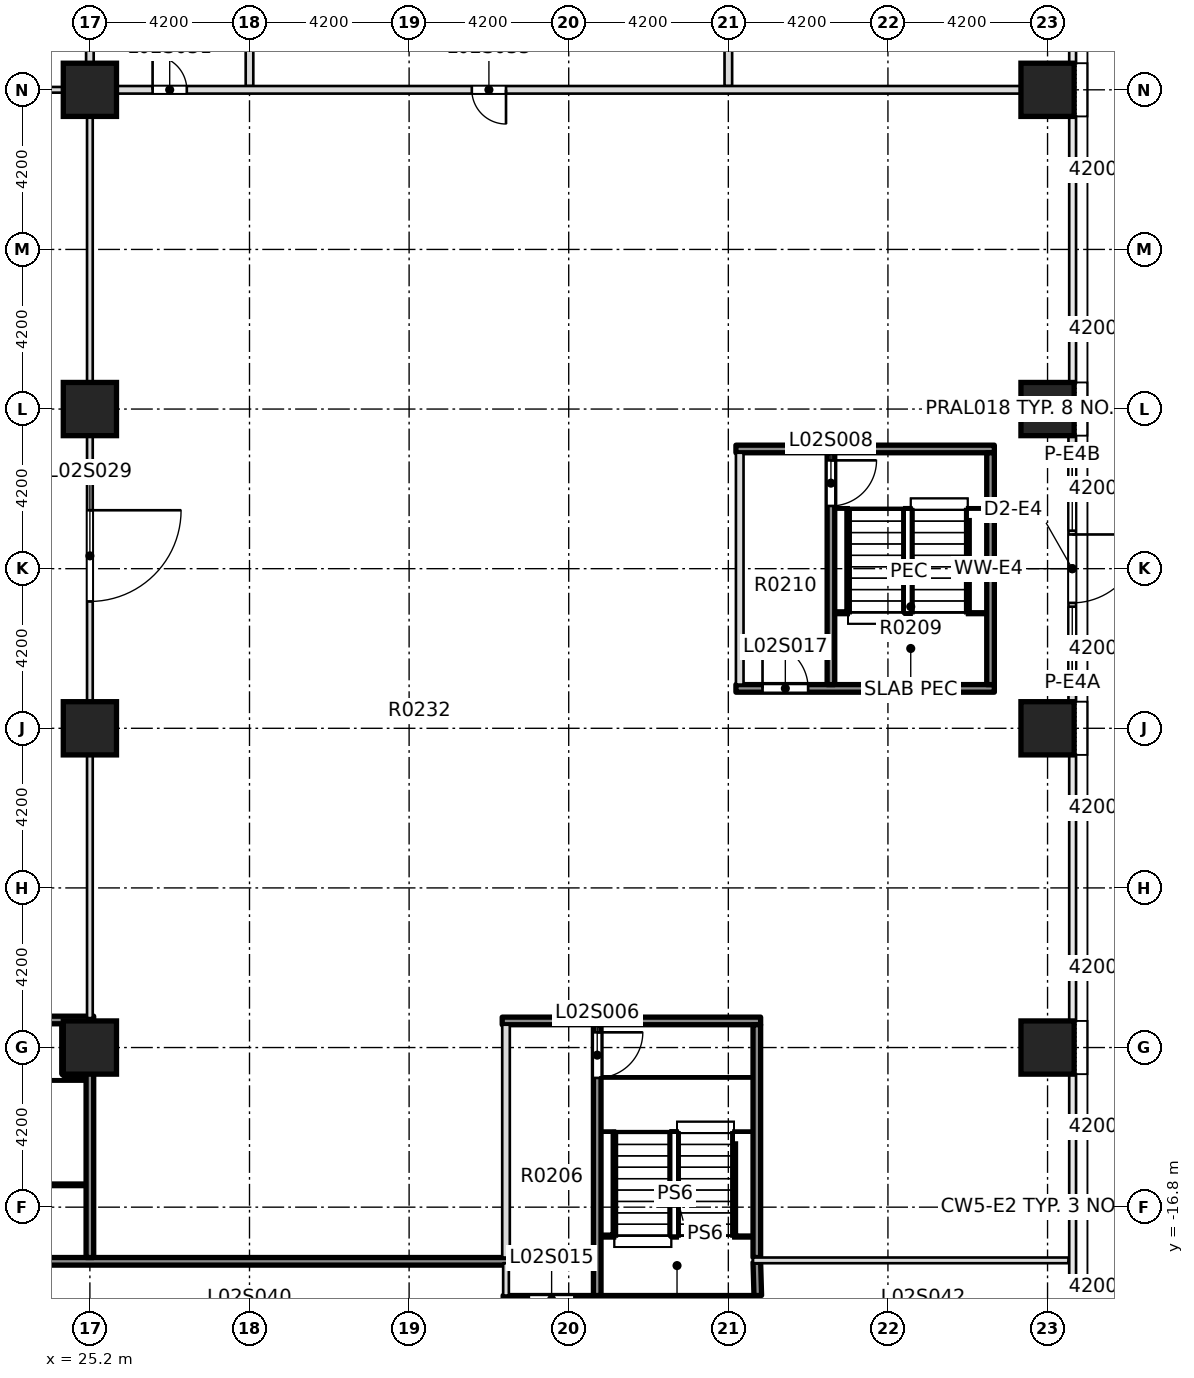
"""IFC4 building model, lengths in metres.
Left out: names, types, materials, properties, quantities, classifications, styles, units other than length and angle.
Written with IfcOpenShell. Run it as: python <this file> out.ifc"""

import sys

from ifc_helpers import new_model, si_unit, direction, frame, frame_2d, origin, origin_2d, place, context, subcontext, project, spatial, rectangle, extrude, element, fill, save


model = new_model("IFC4")
c1 = context("Model", 3, precision=1e-05, world=origin(), true_north=direction((0.0, 1.0)))
c2 = subcontext(c1, "Body", "Model", "MODEL_VIEW")
j1 = project(units=[si_unit("LENGTHUNIT", "METRE"), si_unit("PLANEANGLEUNIT", "RADIAN")], contexts=[c1])
p1 = place(None, origin())
s1 = spatial("IfcSite", under=j1, at=p1, CompositionType="ELEMENT")
p2 = place(p1, origin())
s2 = spatial("IfcBuilding", under=s1, at=p2, CompositionType="ELEMENT")
p3 = place(p2, frame((0.0, 0.0, 12.5)))
s3 = spatial("IfcBuildingStorey", under=s2, at=p3, CompositionType="ELEMENT", Elevation=12.5)
for number, where, z_axis, x_axis in (
    (1, (25.2, -12.6, -0.4), (0.0, 0.0, 1.0), (1.0, 0.0, 0.0)),
    (2, (25.2, -4.2, -0.4), (0.0, 0.0, 1.0), (1.0, 0.0, 0.0)),
    (3, (25.2, 4.2, -0.4), (0.0, 0.0, 1.0), (1.0, 0.0, 0.0)),
    (4, (25.2, 12.6, -0.4), (0.0, 0.0, 1.0), (1.0, 0.0, 0.0)),
    (5, (50.4, -12.6, 0.0), (0.0, 0.0, 1.0), (1.0, 0.0, 0.0)),
    (6, (50.4, -4.2, 0.0), (0.0, 0.0, 1.0), (1.0, 0.0, 0.0)),
    (7, (50.4, 4.2, 0.0), (0.0, 0.0, 1.0), (1.0, 0.0, 0.0)),
    (8, (50.4, 12.6, 0.0), (0.0, 0.0, 1.0), (1.0, 0.0, 0.0)),
):
    element("IfcColumn", number, at=place(p3, frame(where, z_axis=z_axis, x_axis=x_axis)), inside=s3, PredefinedType="COLUMN", context=c2, shape_type="SweptSolid", body=[
        extrude(rectangle(XDim=1.4, YDim=1.4, at=origin_2d()), origin(), (0.0, 0.0, 1.0), 7.5),
    ])
p4 = place(p3, frame((36.075, -19.225, 0.0), z_axis=(0.0, 0.0, 1.0), x_axis=(1.0, 0.0, 0.0)))
e9 = element("IfcWall", 9, at=p4, inside=s3, PredefinedType="SOLIDWALL", context=c2, shape_type="SweptSolid", body=[
    extrude(rectangle(XDim=6.75, YDim=0.2, at=frame_2d((3.375, 0.0))), origin(), (0.0, 0.0, 1.0), 7.1),
])
p5 = place(p4, frame((0.675, 0.0, 0.0)))
e10 = element("IfcOpeningElement", 10, at=p5, cuts=e9, PredefinedType="OPENING", context=c2, shape_type="SweptSolid", body=[
    extrude(rectangle(XDim=1.2, YDim=2.1, at=frame_2d((0.6, 1.05))), frame((0.0, 0.11, 0.0), z_axis=(0.0, -1.0, 0.0), x_axis=(1.0, 0.0, 0.0)), (0.0, 0.0, 1.0), 0.22),
])
p6 = place(p3, frame((12.25, -18.225, 0.0), z_axis=(0.0, 0.0, 1.0), x_axis=(1.0, 0.0, 0.0)))
e11 = element("IfcWall", 11, at=p6, inside=s3, PredefinedType="SOLIDWALL", context=c2, shape_type="SweptSolid", body=[
    extrude(rectangle(XDim=24.0, YDim=0.2, at=frame_2d((12.0, 0.0))), origin(), (0.0, 0.0, 1.0), 7.1),
])
p7 = place(p6, frame((5.15, 0.0, 0.0)))
e12 = element("IfcOpeningElement", 12, at=p7, cuts=e11, PredefinedType="OPENING", context=c2, shape_type="SweptSolid", body=[
    extrude(rectangle(XDim=1.2, YDim=2.1, at=frame_2d((0.6, 1.05))), frame((0.0, 0.11, 0.0), z_axis=(0.0, -1.0, 0.0), x_axis=(1.0, 0.0, 0.0)), (0.0, 0.0, 1.0), 0.22),
])
p8 = place(p6, frame((1.825, 0.0, 0.0)))
e13 = element("IfcOpeningElement", 13, at=p8, cuts=e11, PredefinedType="OPENING", context=c2, shape_type="SweptSolid", body=[
    extrude(rectangle(XDim=0.7, YDim=2.1, at=frame_2d((0.35, 1.05))), frame((0.0, 0.11, 0.0), z_axis=(0.0, -1.0, 0.0), x_axis=(1.0, 0.0, 0.0)), (0.0, 0.0, 1.0), 0.22),
])
p9 = place(p3, frame((42.65, -18.2, 0.0), z_axis=(0.0, 0.0, 1.0), x_axis=(1.0, 0.0, 0.0)))
e14 = element("IfcWall", 14, at=p9, inside=s3, PredefinedType="PARTITIONING", context=c2, shape_type="SweptSolid", body=[
    extrude(rectangle(XDim=8.3, YDim=0.15, at=frame_2d((4.15, 0.0))), origin(), (0.0, 0.0, 1.0), 7.1),
])
p10 = place(p3, frame((16.725, -11.875, 0.0), z_axis=(0.0, 0.0, 1.0), x_axis=(1.0, 0.0, 0.0)))
e15 = element("IfcWall", 15, at=p10, inside=s3, PredefinedType="SOLIDWALL", context=c2, shape_type="SweptSolid", body=[
    extrude(rectangle(XDim=8.575, YDim=0.2, at=frame_2d((4.288, 0.0))), origin(), (0.0, 0.0, 1.0), 7.1),
])
p11 = place(p3, frame((36.05, -11.9, 0.0), z_axis=(0.0, 0.0, 1.0), x_axis=(1.0, 0.0, 0.0)))
e16 = element("IfcWall", 16, at=p11, inside=s3, PredefinedType="SOLIDWALL", context=c2, shape_type="SweptSolid", body=[
    extrude(rectangle(XDim=6.8, YDim=0.2, at=frame_2d((3.4, 0.0))), origin(), (0.0, 0.0, 1.0), 7.1),
])
p12 = place(p3, frame((42.2, -3.15, 0.0), z_axis=(0.0, 0.0, 1.0), x_axis=(1.0, 0.0, 0.0)))
e17 = element("IfcWall", 17, at=p12, inside=s3, PredefinedType="SOLIDWALL", context=c2, shape_type="SweptSolid", body=[
    extrude(rectangle(XDim=6.8, YDim=0.2, at=frame_2d((3.4, 0.0))), origin(), (0.0, 0.0, 1.0), 7.1),
])
p13 = place(p12, frame((0.7, 0.0, 0.0)))
e18 = element("IfcOpeningElement", 18, at=p13, cuts=e17, PredefinedType="OPENING", context=c2, shape_type="SweptSolid", body=[
    extrude(rectangle(XDim=1.2, YDim=2.1, at=frame_2d((0.6, 1.05))), frame((0.0, 0.11, 0.0), z_axis=(0.0, -1.0, 0.0), x_axis=(1.0, 0.0, 0.0)), (0.0, 0.0, 1.0), 0.22),
])
p14 = place(p3, frame((42.2, 3.15, 0.0), z_axis=(0.0, 0.0, 1.0), x_axis=(1.0, 0.0, 0.0)))
e19 = element("IfcWall", 19, at=p14, inside=s3, PredefinedType="SOLIDWALL", context=c2, shape_type="SweptSolid", body=[
    extrude(rectangle(XDim=6.8, YDim=0.2, at=frame_2d((3.4, 0.0))), origin(), (0.0, 0.0, 1.0), 7.1),
])
p15 = place(p3, frame((16.725, 12.6, 0.0), z_axis=(0.0, 0.0, 1.0), x_axis=(1.0, 0.0, 0.0)))
e20 = element("IfcWall", 20, at=p15, inside=s3, PredefinedType="PARTITIONING", context=c2, shape_type="SweptSolid", body=[
    extrude(rectangle(XDim=8.575, YDim=0.15, at=frame_2d((4.288, 0.0))), origin(), (0.0, 0.0, 1.0), 7.1),
])
p16 = place(p3, frame((25.1, 12.6, 0.0), z_axis=(0.0, 0.0, 1.0), x_axis=(1.0, 0.0, 0.0)))
e21 = element("IfcWall", 21, at=p16, inside=s3, PredefinedType="PARTITIONING", context=c2, shape_type="SweptSolid", body=[
    extrude(rectangle(XDim=0.8, YDim=0.2, at=frame_2d((0.4, 0.0))), origin(), (0.0, 0.0, 1.0), 7.1),
])
p17 = place(p3, frame((25.2, -18.125, 0.0), z_axis=(0.0, 0.0, 1.0), x_axis=(0.0, 1.0, 0.0)))
e22 = element("IfcWall", 22, at=p17, inside=s3, PredefinedType="SOLIDWALL", context=c2, shape_type="SweptSolid", body=[
    extrude(rectangle(XDim=6.15, YDim=0.2, at=frame_2d((3.075, 0.0))), origin(), (0.0, 0.0, 1.0), 7.1),
])
p18 = place(p3, frame((25.2, -11.825, 0.0), z_axis=(0.0, 0.0, 1.0), x_axis=(0.0, 1.0, 0.0)))
e23 = element("IfcWall", 23, at=p18, inside=s3, PredefinedType="PARTITIONING", context=c2, shape_type="SweptSolid", body=[
    extrude(rectangle(XDim=24.325, YDim=0.15, at=frame_2d((12.163, 0.0))), origin(), (0.0, 0.0, 1.0), 7.1),
])
p19 = place(p18, frame((10.962, 0.0, 0.0)))
e24 = element("IfcOpeningElement", 24, at=p19, cuts=e23, PredefinedType="OPENING", context=c2, shape_type="SweptSolid", body=[
    extrude(rectangle(XDim=2.4, YDim=2.1, at=frame_2d((1.2, 1.05))), frame((0.0, 0.085, 0.0), z_axis=(0.0, -1.0, 0.0), x_axis=(1.0, 0.0, 0.0)), (0.0, 0.0, 1.0), 0.17),
])
for number, where, z_axis, x_axis in (
    (25, (25.2, 12.7, 0.0), (0.0, 0.0, 1.0), (0.0, 1.0, 0.0)),
    (26, (29.4, 12.7, 0.0), (0.0, 0.0, 1.0), (0.0, 1.0, 0.0)),
):
    element("IfcWall", number, at=place(p3, frame(where, z_axis=z_axis, x_axis=x_axis)), inside=s3, PredefinedType="PARTITIONING", context=c2, shape_type="SweptSolid", body=[
        extrude(rectangle(XDim=8.975, YDim=0.2, at=frame_2d((4.488, 0.0))), origin(), (0.0, 0.0, 1.0), 7.1),
    ])
p20 = place(p3, frame((36.15, -19.125, 0.0), z_axis=(0.0, 0.0, 1.0), x_axis=(0.0, 1.0, 0.0)))
e27 = element("IfcWall", 27, at=p20, inside=s3, PredefinedType="PARTITIONING", context=c2, shape_type="SweptSolid", body=[
    extrude(rectangle(XDim=0.85, YDim=0.15, at=frame_2d((0.425, 0.0))), origin(), (0.0, 0.0, 1.0), 7.1),
])
p21 = place(p3, frame((36.15, -18.125, 0.0), z_axis=(0.0, 0.0, 1.0), x_axis=(0.0, 1.0, 0.0)))
e28 = element("IfcWall", 28, at=p21, inside=s3, PredefinedType="PARTITIONING", context=c2, shape_type="SweptSolid", body=[
    extrude(rectangle(XDim=6.125, YDim=0.2, at=frame_2d((3.062, 0.0))), origin(), (0.0, 0.0, 1.0), 7.1),
])
p22 = place(p3, frame((38.55, -19.125, 0.0), z_axis=(0.0, 0.0, 1.0), x_axis=(0.0, 1.0, 0.0)))
e29 = element("IfcWall", 29, at=p22, inside=s3, PredefinedType="SOLIDWALL", context=c2, shape_type="SweptSolid", body=[
    extrude(rectangle(XDim=7.125, YDim=0.2, at=frame_2d((3.562, 0.0))), origin(), (0.0, 0.0, 1.0), 7.1),
])
p23 = place(p22, frame((5.725, 0.0, 0.0)))
e30 = element("IfcOpeningElement", 30, at=p23, cuts=e29, PredefinedType="OPENING", context=c2, shape_type="SweptSolid", body=[
    extrude(rectangle(XDim=1.2, YDim=2.1, at=frame_2d((0.6, 1.05))), frame((0.0, 0.11, 0.0), z_axis=(0.0, -1.0, 0.0), x_axis=(1.0, 0.0, 0.0)), (0.0, 0.0, 1.0), 0.22),
])
p24 = place(p3, frame((42.0, 12.7, 0.0), z_axis=(0.0, 0.0, 1.0), x_axis=(0.0, 1.0, 0.0)))
e31 = element("IfcWall", 31, at=p24, inside=s3, PredefinedType="PARTITIONING", context=c2, shape_type="SweptSolid", body=[
    extrude(rectangle(XDim=7.575, YDim=0.2, at=frame_2d((3.788, 0.0))), origin(), (0.0, 0.0, 1.0), 7.1),
])
p25 = place(p24, frame((3.337, 0.0, 0.0)))
e32 = element("IfcOpeningElement", 32, at=p25, cuts=e31, PredefinedType="OPENING", context=c2, shape_type="SweptSolid", body=[
    extrude(rectangle(XDim=0.9, YDim=2.1, at=frame_2d((0.45, 1.05))), frame((0.0, 0.11, 0.0), z_axis=(0.0, -1.0, 0.0), x_axis=(1.0, 0.0, 0.0)), (0.0, 0.0, 1.0), 0.22),
])
p26 = place(p3, frame((42.3, -3.05, 0.0), z_axis=(0.0, 0.0, 1.0), x_axis=(0.0, 1.0, 0.0)))
e33 = element("IfcWall", 33, at=p26, inside=s3, PredefinedType="PARTITIONING", context=c2, shape_type="SweptSolid", body=[
    extrude(rectangle(XDim=6.1, YDim=0.2, at=frame_2d((3.05, 0.0))), origin(), (0.0, 0.0, 1.0), 7.1),
])
p27 = place(p3, frame((42.775, -19.125, 0.0), z_axis=(0.0, 0.0, 1.0), x_axis=(-0.028448302746, 0.99959526513, 0.0)))
e34 = element("IfcWall", 34, at=p27, inside=s3, PredefinedType="SOLIDWALL", context=c2, shape_type="SweptSolid", body=[
    extrude(rectangle(XDim=0.875, YDim=0.2, at=frame_2d((0.438, 0.0))), origin(), (0.0, 0.0, 1.0), 7.1),
])
p28 = place(p3, frame((44.7, -3.05, 0.0), z_axis=(0.0, 0.0, 1.0), x_axis=(0.0, 1.0, 0.0)))
e35 = element("IfcWall", 35, at=p28, inside=s3, PredefinedType="SOLIDWALL", context=c2, shape_type="SweptSolid", body=[
    extrude(rectangle(XDim=6.1, YDim=0.2, at=frame_2d((3.05, 0.0))), origin(), (0.0, 0.0, 1.0), 7.1),
])
p29 = place(p28, frame((4.7, 0.0, 0.0)))
e36 = element("IfcOpeningElement", 36, at=p29, cuts=e35, PredefinedType="OPENING", context=c2, shape_type="SweptSolid", body=[
    extrude(rectangle(XDim=1.2, YDim=2.1, at=frame_2d((0.6, 1.05))), frame((0.0, 0.11, 0.0), z_axis=(0.0, -1.0, 0.0), x_axis=(1.0, 0.0, 0.0)), (0.0, 0.0, 1.0), 0.22),
])
p30 = place(p3, frame((48.9, -3.05, 0.0), z_axis=(0.0, 0.0, 1.0), x_axis=(0.0, 1.0, 0.0)))
e37 = element("IfcWall", 37, at=p30, inside=s3, PredefinedType="SOLIDWALL", context=c2, shape_type="SweptSolid", body=[
    extrude(rectangle(XDim=6.1, YDim=0.2, at=frame_2d((3.05, 0.0))), origin(), (0.0, 0.0, 1.0), 7.1),
])
p31 = place(p3, frame((51.05, -3.5, 0.0), z_axis=(0.0, 0.0, 1.0), x_axis=(0.0, 1.0, 0.0)))
e38 = element("IfcWall", 38, at=p31, inside=s3, PredefinedType="STANDARD", context=c2, shape_type="SweptSolid", body=[
    extrude(rectangle(XDim=7.0, YDim=0.2, at=frame_2d((3.5, 0.0))), origin(), (0.0, 0.0, 1.0), 7.1),
])
p32 = place(p31, frame((0.7, 0.0, 0.9)))
e39 = element("IfcOpeningElement", 39, at=p32, cuts=e38, PredefinedType="OPENING", context=c2, shape_type="SweptSolid", body=[
    extrude(rectangle(XDim=1.8, YDim=4.2, at=frame_2d((0.9, 2.1))), frame((0.0, 0.11, 0.0), z_axis=(0.0, -1.0, 0.0), x_axis=(1.0, 0.0, 0.0)), (0.0, 0.0, 1.0), 0.22),
])
p33 = place(p31, frame((2.6, 0.0, 0.0)))
e40 = element("IfcOpeningElement", 40, at=p33, cuts=e38, PredefinedType="OPENING", context=c2, shape_type="SweptSolid", body=[
    extrude(rectangle(XDim=1.8, YDim=2.4, at=frame_2d((0.9, 1.2))), frame((0.0, 0.11, 0.0), z_axis=(0.0, -1.0, 0.0), x_axis=(1.0, 0.0, 0.0)), (0.0, 0.0, 1.0), 0.22),
])
p34 = place(p31, frame((4.5, 0.0, 0.9)))
e41 = element("IfcOpeningElement", 41, at=p34, cuts=e38, PredefinedType="OPENING", context=c2, shape_type="SweptSolid", body=[
    extrude(rectangle(XDim=1.8, YDim=4.2, at=frame_2d((0.9, 2.1))), frame((0.0, 0.11, 0.0), z_axis=(0.0, -1.0, 0.0), x_axis=(1.0, 0.0, 0.0)), (0.0, 0.0, 1.0), 0.22),
])
p35 = place(p3, frame((42.75, -18.125, 0.0), z_axis=(0.0, 0.0, 1.0), x_axis=(0.0, 1.0, 0.0)))
e42 = element("IfcWall", 42, at=p35, inside=s3, PredefinedType="SOLIDWALL", context=c2, shape_type="SweptSolid", body=[
    extrude(rectangle(XDim=6.125, YDim=0.2, at=frame_2d((3.062, 0.0))), origin(), (0.0, 0.0, 1.0), 7.1),
])
p36 = place(p3, frame((25.9, 12.6, 0.0), z_axis=(0.0, 0.0, 1.0), x_axis=(1.0, 0.0, 0.0)))
e43 = element("IfcWall", 43, at=p36, inside=s3, PredefinedType="PARTITIONING", context=c2, shape_type="SweptSolid", body=[
    extrude(rectangle(XDim=23.8, YDim=0.2, at=frame_2d((11.9, 0.0))), origin(), (0.0, 0.0, 1.0), 4.4),
])
p37 = place(p36, frame((0.95, 0.0, 0.0)))
e44 = element("IfcOpeningElement", 44, at=p37, cuts=e43, PredefinedType="OPENING", context=c2, shape_type="SweptSolid", body=[
    extrude(rectangle(XDim=0.9, YDim=2.1, at=frame_2d((0.45, 1.05))), frame((0.0, 0.11, 0.0), z_axis=(0.0, -1.0, 0.0), x_axis=(1.0, 0.0, 0.0)), (0.0, 0.0, 1.0), 0.22),
])
p38 = place(p36, frame((9.35, 0.0, 0.0)))
e45 = element("IfcOpeningElement", 45, at=p38, cuts=e43, PredefinedType="OPENING", context=c2, shape_type="SweptSolid", body=[
    extrude(rectangle(XDim=0.9, YDim=2.1, at=frame_2d((0.45, 1.05))), frame((0.0, 0.11, 0.0), z_axis=(0.0, -1.0, 0.0), x_axis=(1.0, 0.0, 0.0)), (0.0, 0.0, 1.0), 0.22),
])
p39 = place(p3, frame((49.7, 12.6, 0.0), z_axis=(0.0, 0.0, 1.0), x_axis=(1.0, 0.0, 0.0)))
e46 = element("IfcWall", 46, at=p39, inside=s3, PredefinedType="PARTITIONING", context=c2, shape_type="SweptSolid", body=[
    extrude(rectangle(XDim=1.25, YDim=0.2, at=frame_2d((0.625, 0.0))), origin(), (0.0, 0.0, 1.0), 7.1),
])
p40 = place(p23, origin())
e47 = element("IfcDoor", 47, at=p40, inside=s3, OperationType="DOUBLE_DOOR_SINGLE_SWING", PredefinedType="DOOR", context=c2, shape_type="SweptSolid", body=[
    extrude(rectangle(XDim=1.2, YDim=2.1, at=frame_2d((0.6, 1.05))), frame((0.0, 0.025, 0.0), z_axis=(0.0, -1.0, 0.0), x_axis=(1.0, 0.0, 0.0)), (0.0, 0.0, 1.0), 0.05),
])
fill(e30, e47)
p41 = place(p29, origin())
e48 = element("IfcDoor", 48, at=p41, inside=s3, OperationType="DOUBLE_DOOR_SINGLE_SWING", PredefinedType="DOOR", context=c2, shape_type="SweptSolid", body=[
    extrude(rectangle(XDim=1.2, YDim=2.1, at=frame_2d((0.6, 1.05))), frame((0.0, 0.025, 0.0), z_axis=(0.0, -1.0, 0.0), x_axis=(1.0, 0.0, 0.0)), (0.0, 0.0, 1.0), 0.05),
])
fill(e36, e48)
p42 = place(p13, origin())
e49 = element("IfcDoor", 49, at=p42, inside=s3, OperationType="SINGLE_SWING_LEFT", PredefinedType="DOOR", context=c2, shape_type="SweptSolid", body=[
    extrude(rectangle(XDim=1.2, YDim=2.1, at=frame_2d((0.6, 1.05))), frame((0.0, 0.025, 0.0), z_axis=(0.0, -1.0, 0.0), x_axis=(1.0, 0.0, 0.0)), (0.0, 0.0, 1.0), 0.05),
])
fill(e18, e49)
p43 = place(p19, origin())
e50 = element("IfcDoor", 50, at=p43, inside=s3, OperationType="DOUBLE_DOOR_SINGLE_SWING", PredefinedType="DOOR", context=c2, shape_type="SweptSolid", body=[
    extrude(rectangle(XDim=2.4, YDim=2.1, at=frame_2d((1.2, 1.05))), frame((0.0, 0.025, 0.0), z_axis=(0.0, -1.0, 0.0), x_axis=(1.0, 0.0, 0.0)), (0.0, 0.0, 1.0), 0.05),
])
fill(e24, e50)
p44 = place(p37, origin())
e51 = element("IfcDoor", 51, at=p44, inside=s3, OperationType="SINGLE_SWING_RIGHT", PredefinedType="DOOR", context=c2, shape_type="SweptSolid", body=[
    extrude(rectangle(XDim=0.9, YDim=2.1, at=frame_2d((0.45, 1.05))), frame((0.0, 0.025, 0.0), z_axis=(0.0, -1.0, 0.0), x_axis=(1.0, 0.0, 0.0)), (0.0, 0.0, 1.0), 0.05),
])
fill(e44, e51)
p45 = place(p38, origin())
e52 = element("IfcDoor", 52, at=p45, inside=s3, OperationType="SINGLE_SWING_LEFT", PredefinedType="DOOR", context=c2, shape_type="SweptSolid", body=[
    extrude(rectangle(XDim=0.9, YDim=2.1, at=frame_2d((0.45, 1.05))), frame((0.0, 0.025, 0.0), z_axis=(0.0, -1.0, 0.0), x_axis=(1.0, 0.0, 0.0)), (0.0, 0.0, 1.0), 0.05),
])
fill(e45, e52)
p46 = place(p32, origin())
e53 = element("IfcWindow", 53, at=p46, inside=s3, PartitioningType="SINGLE_PANEL", PredefinedType="WINDOW", context=c2, shape_type="SweptSolid", body=[
    extrude(rectangle(XDim=1.8, YDim=4.2, at=frame_2d((0.9, 2.1))), frame((0.0, 0.03, 0.0), z_axis=(0.0, -1.0, 0.0), x_axis=(1.0, 0.0, 0.0)), (0.0, 0.0, 1.0), 0.06),
])
fill(e39, e53)
p47 = place(p33, origin())
e54 = element("IfcDoor", 54, at=p47, inside=s3, OperationType="SINGLE_SWING_LEFT", PredefinedType="DOOR", context=c2, shape_type="SweptSolid", body=[
    extrude(rectangle(XDim=1.8, YDim=2.4, at=frame_2d((0.9, 1.2))), frame((0.0, 0.025, 0.0), z_axis=(0.0, -1.0, 0.0), x_axis=(1.0, 0.0, 0.0)), (0.0, 0.0, 1.0), 0.05),
])
fill(e40, e54)
p48 = place(p34, origin())
e55 = element("IfcWindow", 55, at=p48, inside=s3, PartitioningType="SINGLE_PANEL", PredefinedType="WINDOW", context=c2, shape_type="SweptSolid", body=[
    extrude(rectangle(XDim=1.8, YDim=4.2, at=frame_2d((0.9, 2.1))), frame((0.0, 0.03, 0.0), z_axis=(0.0, -1.0, 0.0), x_axis=(1.0, 0.0, 0.0)), (0.0, 0.0, 1.0), 0.06),
])
fill(e41, e55)
save(model, sys.argv[1])
